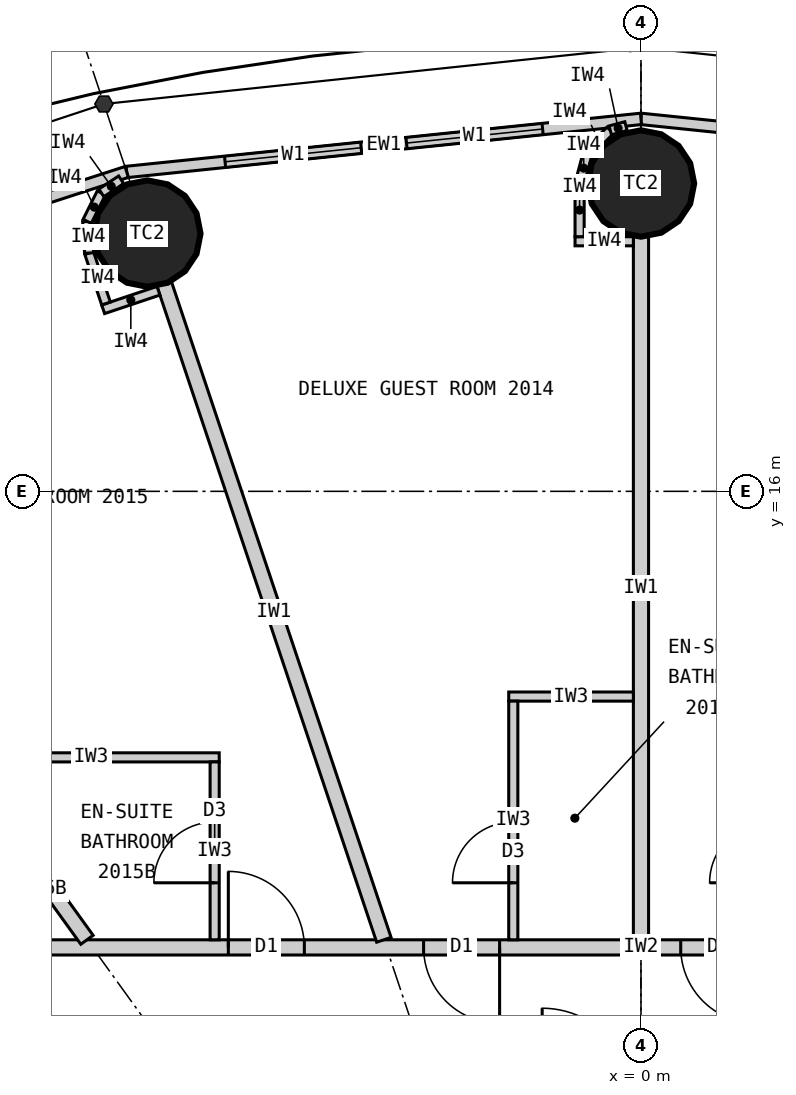
"""IFC4 building model, lengths in metres.
Left out: names, types, materials, properties, quantities, classifications, styles, units other than length and angle.
Written with IfcOpenShell. Run it as: python <this file> out.ifc"""

import sys

from ifc_helpers import new_model, si_unit, direction, frame, frame_2d, origin, origin_2d, place, context, subcontext, project, spatial, rectangle, circle, extrude, element, fill, save


model = new_model("IFC4")
c1 = context("Model", 3, precision=1e-05, world=origin(), true_north=direction((0.0, 1.0)))
c2 = subcontext(c1, "Body", "Model", "MODEL_VIEW")
j1 = project(units=[si_unit("LENGTHUNIT", "METRE"), si_unit("PLANEANGLEUNIT", "RADIAN")], contexts=[c1])
p1 = place(None, origin())
s1 = spatial("IfcSite", under=j1, at=p1, CompositionType="ELEMENT")
p2 = place(p1, origin())
s2 = spatial("IfcBuilding", under=s1, at=p2, CompositionType="ELEMENT")
p3 = place(p2, frame((0.0, 0.0, 80.4)))
s3 = spatial("IfcBuildingStorey", under=s2, at=p3, CompositionType="ELEMENT", Elevation=80.4)
for number, where, z_axis, x_axis in (
    (1, (0.0, 20.05, 0.0), (0.0, 0.0, 1.0), (1.0, 0.0, 0.0)),
    (2, (-6.495, 19.391, 0.0), (0.0, 0.0, 1.0), (1.0, 0.0, 0.0)),
):
    element("IfcColumn", number, at=place(p3, frame(where, z_axis=z_axis, x_axis=x_axis)), inside=s3, PredefinedType="COLUMN", context=c2, shape_type="SweptSolid", body=[
        extrude(circle(Radius=0.7, at=origin_2d()), origin(), (0.0, 0.0, 1.0), 3.3),
    ])
p4 = place(p3, frame((6.766, 20.202, 0.0), z_axis=(0.0, 0.0, 1.0), x_axis=(-0.994721394369, 0.102612609291, 0.0)))
e3 = element("IfcWall", 3, at=p4, inside=s3, PredefinedType="ELEMENTEDWALL", context=c2, shape_type="SweptSolid", body=[
    extrude(rectangle(XDim=6.802, YDim=0.15, at=frame_2d((3.401, 0.0))), origin(), (0.0, 0.0, 1.0), 3.12),
])
p5 = place(p4, frame((1.301, 0.0, 0.9)))
e4 = element("IfcOpeningElement", 4, at=p5, cuts=e3, PredefinedType="OPENING", context=c2, shape_type="SweptSolid", body=[
    extrude(rectangle(XDim=1.8, YDim=1.9, at=frame_2d((0.9, 0.95))), frame((0.0, 0.085, 0.0), z_axis=(0.0, -1.0, 0.0), x_axis=(1.0, 0.0, 0.0)), (0.0, 0.0, 1.0), 0.17),
])
p6 = place(p4, frame((3.701, 0.0, 0.9)))
e5 = element("IfcOpeningElement", 5, at=p6, cuts=e3, PredefinedType="OPENING", context=c2, shape_type="SweptSolid", body=[
    extrude(rectangle(XDim=1.8, YDim=1.9, at=frame_2d((0.9, 0.95))), frame((0.0, 0.085, 0.0), z_axis=(0.0, -1.0, 0.0), x_axis=(1.0, 0.0, 0.0)), (0.0, 0.0, 1.0), 0.17),
])
p7 = place(p3, frame((0.0, 20.9, 0.0), z_axis=(0.0, 0.0, 1.0), x_axis=(-0.994721394369, -0.102612609291, 0.0)))
e6 = element("IfcWall", 6, at=p7, inside=s3, PredefinedType="ELEMENTEDWALL", context=c2, shape_type="SweptSolid", body=[
    extrude(rectangle(XDim=6.802, YDim=0.15, at=frame_2d((3.401, 0.0))), origin(), (0.0, 0.0, 1.0), 3.12),
])
p8 = place(p7, frame((1.301, 0.0, 0.9)))
e7 = element("IfcOpeningElement", 7, at=p8, cuts=e6, PredefinedType="OPENING", context=c2, shape_type="SweptSolid", body=[
    extrude(rectangle(XDim=1.8, YDim=1.9, at=frame_2d((0.9, 0.95))), frame((0.0, 0.085, 0.0), z_axis=(0.0, -1.0, 0.0), x_axis=(1.0, 0.0, 0.0)), (0.0, 0.0, 1.0), 0.17),
])
p9 = place(p7, frame((3.701, 0.0, 0.9)))
e8 = element("IfcOpeningElement", 8, at=p9, cuts=e6, PredefinedType="OPENING", context=c2, shape_type="SweptSolid", body=[
    extrude(rectangle(XDim=1.8, YDim=1.9, at=frame_2d((0.9, 0.95))), frame((0.0, 0.085, 0.0), z_axis=(0.0, -1.0, 0.0), x_axis=(1.0, 0.0, 0.0)), (0.0, 0.0, 1.0), 0.17),
])
p10 = place(p3, frame((-6.766, 20.202, 0.0), z_axis=(0.0, 0.0, 1.0), x_axis=(-0.951137534625, -0.308767534285, 0.0)))
e9 = element("IfcWall", 9, at=p10, inside=s3, PredefinedType="ELEMENTEDWALL", context=c2, shape_type="SweptSolid", body=[
    extrude(rectangle(XDim=6.655, YDim=0.15, at=frame_2d((3.328, 0.0))), origin(), (0.0, 0.0, 1.0), 3.12),
])
p11 = place(p10, frame((1.228, 0.0, 0.9)))
e10 = element("IfcOpeningElement", 10, at=p11, cuts=e9, PredefinedType="OPENING", context=c2, shape_type="SweptSolid", body=[
    extrude(rectangle(XDim=1.8, YDim=1.9, at=frame_2d((0.9, 0.95))), frame((0.0, 0.085, 0.0), z_axis=(0.0, -1.0, 0.0), x_axis=(1.0, 0.0, 0.0)), (0.0, 0.0, 1.0), 0.17),
])
p12 = place(p10, frame((3.628, 0.0, 0.9)))
e11 = element("IfcOpeningElement", 11, at=p12, cuts=e9, PredefinedType="OPENING", context=c2, shape_type="SweptSolid", body=[
    extrude(rectangle(XDim=1.8, YDim=1.9, at=frame_2d((0.9, 0.95))), frame((0.0, 0.085, 0.0), z_axis=(0.0, -1.0, 0.0), x_axis=(1.0, 0.0, 0.0)), (0.0, 0.0, 1.0), 0.17),
])
p13 = place(p3, frame((-14.1, 10.0, 0.0), z_axis=(0.0, 0.0, 1.0), x_axis=(1.0, 0.0, 0.0)))
e12 = element("IfcWall", 12, at=p13, inside=s3, PredefinedType="PARTITIONING", context=c2, shape_type="SweptSolid", body=[
    extrude(rectangle(XDim=28.2, YDim=0.2, at=frame_2d((14.1, 0.0))), origin(), (0.0, 0.0, 1.0), 3.12),
])
p14 = place(p13, frame((23.865, 0.0, 0.0)))
e13 = element("IfcOpeningElement", 13, at=p14, cuts=e12, PredefinedType="OPENING", context=c2, shape_type="SweptSolid", body=[
    extrude(rectangle(XDim=1.0, YDim=2.2, at=frame_2d((0.5, 1.1))), frame((0.0, 0.11, 0.0), z_axis=(0.0, -1.0, 0.0), x_axis=(1.0, 0.0, 0.0)), (0.0, 0.0, 1.0), 0.22),
])
p15 = place(p13, frame((18.529, 0.0, 0.0)))
e14 = element("IfcOpeningElement", 14, at=p15, cuts=e12, PredefinedType="OPENING", context=c2, shape_type="SweptSolid", body=[
    extrude(rectangle(XDim=1.0, YDim=2.2, at=frame_2d((0.5, 1.1))), frame((0.0, 0.11, 0.0), z_axis=(0.0, -1.0, 0.0), x_axis=(1.0, 0.0, 0.0)), (0.0, 0.0, 1.0), 0.22),
])
p16 = place(p13, frame((14.623, 0.0, 0.0)))
e15 = element("IfcOpeningElement", 15, at=p16, cuts=e12, PredefinedType="OPENING", context=c2, shape_type="SweptSolid", body=[
    extrude(rectangle(XDim=1.0, YDim=2.2, at=frame_2d((0.5, 1.1))), frame((0.0, 0.11, 0.0), z_axis=(0.0, -1.0, 0.0), x_axis=(1.0, 0.0, 0.0)), (0.0, 0.0, 1.0), 0.22),
])
p17 = place(p13, frame((11.24, 0.0, 0.0)))
e16 = element("IfcOpeningElement", 16, at=p17, cuts=e12, PredefinedType="OPENING", context=c2, shape_type="SweptSolid", body=[
    extrude(rectangle(XDim=1.0, YDim=2.2, at=frame_2d((0.5, 1.1))), frame((0.0, 0.11, 0.0), z_axis=(0.0, -1.0, 0.0), x_axis=(1.0, 0.0, 0.0)), (0.0, 0.0, 1.0), 0.22),
])
p18 = place(p13, frame((8.671, 0.0, 0.0)))
e17 = element("IfcOpeningElement", 17, at=p18, cuts=e12, PredefinedType="OPENING", context=c2, shape_type="SweptSolid", body=[
    extrude(rectangle(XDim=1.0, YDim=2.2, at=frame_2d((0.5, 1.1))), frame((0.0, 0.11, 0.0), z_axis=(0.0, -1.0, 0.0), x_axis=(1.0, 0.0, 0.0)), (0.0, 0.0, 1.0), 0.22),
])
p19 = place(p13, frame((2.801, 0.0, 0.0)))
e18 = element("IfcOpeningElement", 18, at=p19, cuts=e12, PredefinedType="OPENING", context=c2, shape_type="SweptSolid", body=[
    extrude(rectangle(XDim=1.0, YDim=2.2, at=frame_2d((0.5, 1.1))), frame((0.0, 0.11, 0.0), z_axis=(0.0, -1.0, 0.0), x_axis=(1.0, 0.0, 0.0)), (0.0, 0.0, 1.0), 0.22),
])
p20 = place(p3, frame((0.0, 10.1, 0.0), z_axis=(0.0, 0.0, 1.0), x_axis=(0.0, 1.0, 0.0)))
e19 = element("IfcWall", 19, at=p20, inside=s3, PredefinedType="PARTITIONING", context=c2, shape_type="SweptSolid", body=[
    extrude(rectangle(XDim=9.25, YDim=0.2, at=frame_2d((4.625, 0.0))), origin(), (0.0, 0.0, 1.0), 2.32),
])
p21 = place(p3, frame((-3.383, 10.1, 0.0), z_axis=(0.0, 0.0, 1.0), x_axis=(-0.31759592231, 0.948226149256, 0.0)))
e20 = element("IfcWall", 20, at=p21, inside=s3, PredefinedType="PARTITIONING", context=c2, shape_type="SweptSolid", body=[
    extrude(rectangle(XDim=9.098, YDim=0.2, at=frame_2d((4.549, 0.0))), origin(), (0.0, 0.0, 1.0), 2.32),
])
p22 = place(p3, frame((-7.289, 10.1, 0.0), z_axis=(0.0, 0.0, 1.0), x_axis=(-0.585198353053, 0.810890182197, 0.0)))
e21 = element("IfcWall", 21, at=p22, inside=s3, PredefinedType="PARTITIONING", context=c2, shape_type="SweptSolid", body=[
    extrude(rectangle(XDim=8.36, YDim=0.2, at=frame_2d((4.18, 0.0))), origin(), (0.0, 0.0, 1.0), 2.32),
])
p23 = place(p3, frame((-0.1, 13.3, 0.0), z_axis=(0.0, 0.0, 1.0), x_axis=(-1.0, 0.0, 0.0)))
e22 = element("IfcWall", 22, at=p23, inside=s3, PredefinedType="PARTITIONING", context=c2, shape_type="SweptSolid", body=[
    extrude(rectangle(XDim=1.64, YDim=0.12, at=frame_2d((0.82, 0.0))), origin(), (0.0, 0.0, 1.0), 3.12),
])
p24 = place(p3, frame((-1.68, 10.1, 0.0), z_axis=(0.0, 0.0, 1.0), x_axis=(0.0, 1.0, 0.0)))
e23 = element("IfcWall", 23, at=p24, inside=s3, PredefinedType="PARTITIONING", context=c2, shape_type="SweptSolid", body=[
    extrude(rectangle(XDim=3.14, YDim=0.12, at=frame_2d((1.57, 0.0))), origin(), (0.0, 0.0, 1.0), 3.12),
])
p25 = place(p24, frame((0.75, 0.0, 0.0)))
e24 = element("IfcOpeningElement", 24, at=p25, cuts=e23, PredefinedType="OPENING", context=c2, shape_type="SweptSolid", body=[
    extrude(rectangle(XDim=0.8, YDim=2.1, at=frame_2d((0.4, 1.05))), frame((0.0, 0.07, 0.0), z_axis=(0.0, -1.0, 0.0), x_axis=(1.0, 0.0, 0.0)), (0.0, 0.0, 1.0), 0.14),
])
p26 = place(p3, frame((-8.921, 12.5, 0.0), z_axis=(0.0, 0.0, 1.0), x_axis=(1.0, 0.0, 0.0)))
e25 = element("IfcWall", 25, at=p26, inside=s3, PredefinedType="PARTITIONING", context=c2, shape_type="SweptSolid", body=[
    extrude(rectangle(XDim=3.372, YDim=0.12, at=frame_2d((1.686, 0.0))), origin(), (0.0, 0.0, 1.0), 3.12),
])
p27 = place(p3, frame((-5.609, 10.1, 0.0), z_axis=(0.0, 0.0, 1.0), x_axis=(0.0, 1.0, 0.0)))
e26 = element("IfcWall", 26, at=p27, inside=s3, PredefinedType="PARTITIONING", context=c2, shape_type="SweptSolid", body=[
    extrude(rectangle(XDim=2.34, YDim=0.12, at=frame_2d((1.17, 0.0))), origin(), (0.0, 0.0, 1.0), 3.12),
])
p28 = place(p27, frame((0.75, 0.0, 0.0)))
e27 = element("IfcOpeningElement", 27, at=p28, cuts=e26, PredefinedType="OPENING", context=c2, shape_type="SweptSolid", body=[
    extrude(rectangle(XDim=0.8, YDim=2.1, at=frame_2d((0.4, 1.05))), frame((0.0, 0.07, 0.0), z_axis=(0.0, -1.0, 0.0), x_axis=(1.0, 0.0, 0.0)), (0.0, 0.0, 1.0), 0.14),
])
p29 = place(p3, frame((-0.1, 19.29, 0.0), z_axis=(0.0, 0.0, 1.0), x_axis=(-1.0, 0.0, 0.0)))
e28 = element("IfcWall", 28, at=p29, inside=s3, PredefinedType="PARTITIONING", context=c2, shape_type="SweptSolid", body=[
    extrude(rectangle(XDim=0.767, YDim=0.12, at=frame_2d((0.384, 0.0))), origin(), (0.0, 0.0, 1.0), 3.12),
])
p30 = place(p3, frame((-0.808, 19.35, 0.0), z_axis=(0.0, 0.0, 1.0), x_axis=(0.0, 1.0, 0.0)))
e29 = element("IfcWall", 29, at=p30, inside=s3, PredefinedType="PARTITIONING", context=c2, shape_type="SweptSolid", body=[
    extrude(rectangle(XDim=0.7, YDim=0.12, at=frame_2d((0.35, 0.0))), origin(), (0.0, 0.0, 1.0), 3.12),
])
p31 = place(p3, frame((-0.808, 20.05, 0.0), z_axis=(0.0, 0.0, 1.0), x_axis=(0.2592614205, 0.965807183573, 0.0)))
e30 = element("IfcWall", 30, at=p31, inside=s3, PredefinedType="PARTITIONING", context=c2, shape_type="SweptSolid", body=[
    extrude(rectangle(XDim=0.418, YDim=0.12, at=frame_2d((0.209, 0.0))), origin(), (0.0, 0.0, 1.0), 3.12),
])
p32 = place(p3, frame((-0.699, 20.454, 0.0), z_axis=(0.0, 0.0, 1.0), x_axis=(0.707106781187, 0.707106781187, 0.0)))
e31 = element("IfcWall", 31, at=p32, inside=s3, PredefinedType="PARTITIONING", context=c2, shape_type="SweptSolid", body=[
    extrude(rectangle(XDim=0.418, YDim=0.12, at=frame_2d((0.209, 0.0))), origin(), (0.0, 0.0, 1.0), 3.12),
])
p33 = place(p3, frame((-0.404, 20.749, 0.0), z_axis=(0.0, 0.0, 1.0), x_axis=(0.965759066438, 0.25944060128, 0.0)))
e32 = element("IfcWall", 32, at=p33, inside=s3, PredefinedType="PARTITIONING", context=c2, shape_type="SweptSolid", body=[
    extrude(rectangle(XDim=0.214, YDim=0.12, at=frame_2d((0.107, 0.0))), origin(), (0.0, 0.0, 1.0), 3.12),
])
p34 = place(p3, frame((-6.348, 18.639, 0.0), z_axis=(0.0, 0.0, 1.0), x_axis=(-0.948268951266, -0.317468102437, 0.0)))
e33 = element("IfcWall", 33, at=p34, inside=s3, PredefinedType="PARTITIONING", context=c2, shape_type="SweptSolid", body=[
    extrude(rectangle(XDim=0.768, YDim=0.12, at=frame_2d((0.384, 0.0))), origin(), (0.0, 0.0, 1.0), 3.12),
])
p35 = place(p3, frame((-7.038, 18.471, 0.0), z_axis=(0.0, 0.0, 1.0), x_axis=(-0.317378466199, 0.9482989556, 0.0)))
e34 = element("IfcWall", 34, at=p35, inside=s3, PredefinedType="PARTITIONING", context=c2, shape_type="SweptSolid", body=[
    extrude(rectangle(XDim=0.7, YDim=0.12, at=frame_2d((0.35, 0.0))), origin(), (0.0, 0.0, 1.0), 3.12),
])
p36 = place(p3, frame((-7.26, 19.135, 0.0), z_axis=(0.0, 0.0, 1.0), x_axis=(-0.0613238046, 0.99811792439, 0.0)))
e35 = element("IfcWall", 35, at=p36, inside=s3, PredefinedType="PARTITIONING", context=c2, shape_type="SweptSolid", body=[
    extrude(rectangle(XDim=0.418, YDim=0.12, at=frame_2d((0.209, 0.0))), origin(), (0.0, 0.0, 1.0), 3.12),
])
p37 = place(p3, frame((-7.286, 19.552, 0.0), z_axis=(0.0, 0.0, 1.0), x_axis=(0.445810757773, 0.89512723579, 0.0)))
e36 = element("IfcWall", 36, at=p37, inside=s3, PredefinedType="PARTITIONING", context=c2, shape_type="SweptSolid", body=[
    extrude(rectangle(XDim=0.418, YDim=0.12, at=frame_2d((0.209, 0.0))), origin(), (0.0, 0.0, 1.0), 3.12),
])
p38 = place(p3, frame((-7.1, 19.926, 0.0), z_axis=(0.0, 0.0, 1.0), x_axis=(0.833488262509, 0.552537162787, 0.0)))
e37 = element("IfcWall", 37, at=p38, inside=s3, PredefinedType="PARTITIONING", context=c2, shape_type="SweptSolid", body=[
    extrude(rectangle(XDim=0.313, YDim=0.12, at=frame_2d((0.156, 0.0))), origin(), (0.0, 0.0, 1.0), 3.12),
])
p39 = place(p8, origin())
e38 = element("IfcWindow", 38, at=p39, inside=s3, PartitioningType="SINGLE_PANEL", PredefinedType="WINDOW", context=c2, shape_type="SweptSolid", body=[
    extrude(rectangle(XDim=1.8, YDim=1.9, at=frame_2d((0.9, 0.95))), frame((0.0, 0.03, 0.0), z_axis=(0.0, -1.0, 0.0), x_axis=(1.0, 0.0, 0.0)), (0.0, 0.0, 1.0), 0.06),
])
fill(e7, e38)
p40 = place(p9, origin())
e39 = element("IfcWindow", 39, at=p40, inside=s3, PartitioningType="SINGLE_PANEL", PredefinedType="WINDOW", context=c2, shape_type="SweptSolid", body=[
    extrude(rectangle(XDim=1.8, YDim=1.9, at=frame_2d((0.9, 0.95))), frame((0.0, 0.03, 0.0), z_axis=(0.0, -1.0, 0.0), x_axis=(1.0, 0.0, 0.0)), (0.0, 0.0, 1.0), 0.06),
])
fill(e8, e39)
p41 = place(p16, origin())
e40 = element("IfcDoor", 40, at=p41, inside=s3, OperationType="SINGLE_SWING_RIGHT", PredefinedType="DOOR", context=c2, shape_type="SweptSolid", body=[
    extrude(rectangle(XDim=1.0, YDim=2.2, at=frame_2d((0.5, 1.1))), frame((0.0, 0.025, 0.0), z_axis=(0.0, -1.0, 0.0), x_axis=(1.0, 0.0, 0.0)), (0.0, 0.0, 1.0), 0.05),
])
fill(e15, e40)
p42 = place(p25, origin())
e41 = element("IfcDoor", 41, at=p42, inside=s3, OperationType="SINGLE_SWING_LEFT", PredefinedType="DOOR", context=c2, shape_type="SweptSolid", body=[
    extrude(rectangle(XDim=0.8, YDim=2.1, at=frame_2d((0.4, 1.05))), frame((0.0, 0.025, 0.0), z_axis=(0.0, -1.0, 0.0), x_axis=(1.0, 0.0, 0.0)), (0.0, 0.0, 1.0), 0.05),
])
fill(e24, e41)
p43 = place(p17, origin())
e42 = element("IfcDoor", 42, at=p43, inside=s3, OperationType="SINGLE_SWING_RIGHT", PredefinedType="DOOR", context=c2, shape_type="SweptSolid", body=[
    extrude(rectangle(XDim=1.0, YDim=2.2, at=frame_2d((0.5, 1.1))), frame((0.0, 0.025, 0.0), z_axis=(0.0, -1.0, 0.0), x_axis=(1.0, 0.0, 0.0)), (0.0, 0.0, 1.0), 0.05),
])
fill(e16, e42)
p44 = place(p28, origin())
e43 = element("IfcDoor", 43, at=p44, inside=s3, OperationType="SINGLE_SWING_LEFT", PredefinedType="DOOR", context=c2, shape_type="SweptSolid", body=[
    extrude(rectangle(XDim=0.8, YDim=2.1, at=frame_2d((0.4, 1.05))), frame((0.0, 0.025, 0.0), z_axis=(0.0, -1.0, 0.0), x_axis=(1.0, 0.0, 0.0)), (0.0, 0.0, 1.0), 0.05),
])
fill(e27, e43)
p45 = place(p18, origin())
e44 = element("IfcDoor", 44, at=p45, inside=s3, OperationType="SINGLE_SWING_LEFT", PredefinedType="DOOR", context=c2, shape_type="SweptSolid", body=[
    extrude(rectangle(XDim=1.0, YDim=2.2, at=frame_2d((0.5, 1.1))), frame((0.0, 0.025, 0.0), z_axis=(0.0, -1.0, 0.0), x_axis=(1.0, 0.0, 0.0)), (0.0, 0.0, 1.0), 0.05),
])
fill(e17, e44)
save(model, sys.argv[1])
